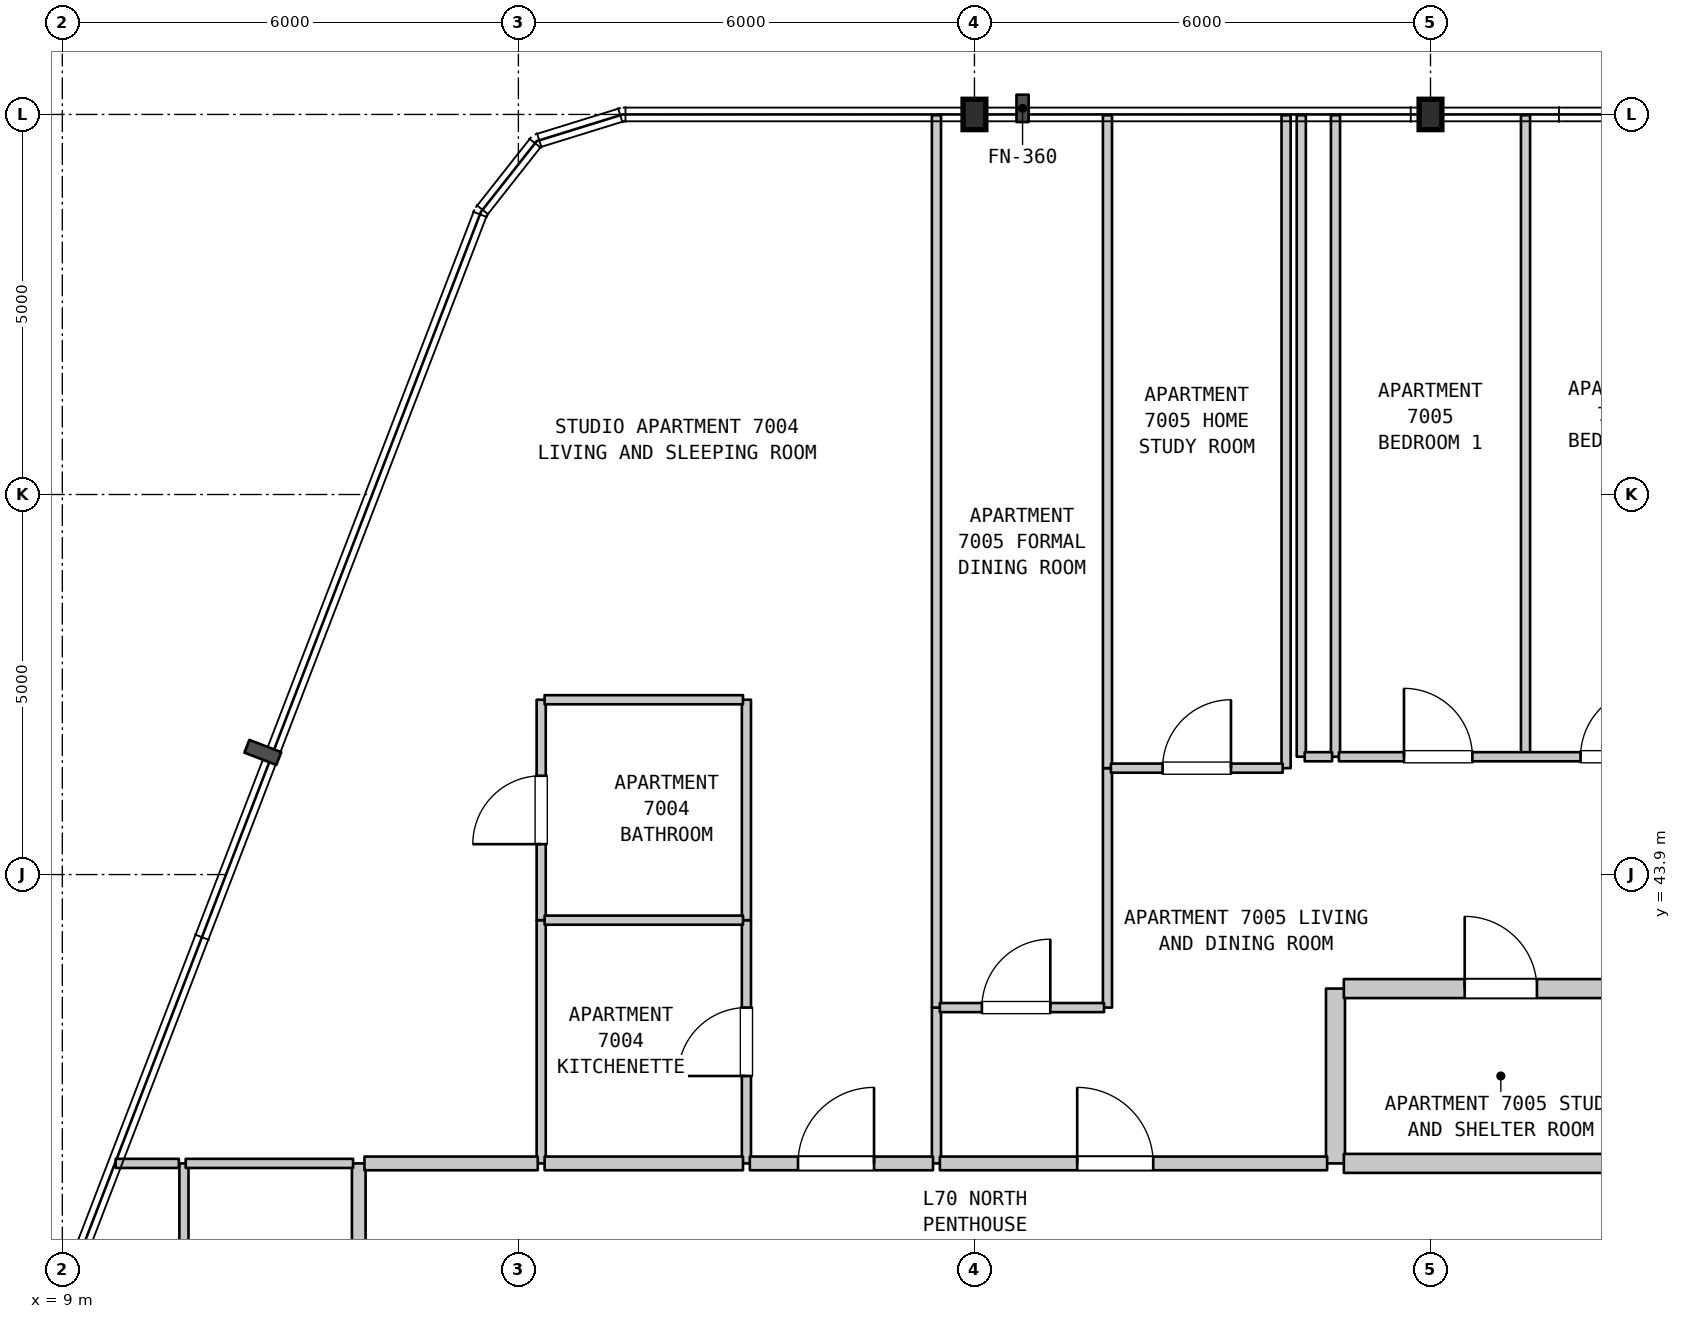
"""IFC4 building model, lengths in metres.
Left out: names, types, materials, properties, quantities, classifications, styles, units other than length and angle.
Written with IfcOpenShell. Run it as: python <this file> out.ifc"""

import sys

from ifc_helpers import new_model, si_unit, direction, frame, frame_2d, origin, origin_2d, place, context, subcontext, project, spatial, rectangle, i_section, extrude, element, fill, save


model = new_model("IFC4")
c1 = context("Model", 3, precision=1e-05, world=origin(), true_north=direction((0.0, 1.0)))
c2 = subcontext(c1, "Body", "Model", "MODEL_VIEW")
j1 = project(units=[si_unit("LENGTHUNIT", "METRE"), si_unit("PLANEANGLEUNIT", "RADIAN")], contexts=[c1])
p1 = place(None, origin())
s1 = spatial("IfcSite", under=j1, at=p1, CompositionType="ELEMENT")
p2 = place(p1, origin())
s2 = spatial("IfcBuilding", under=s1, at=p2, CompositionType="ELEMENT")
p3 = place(p2, frame((0.0, 0.0, 280.6)))
s3 = spatial("IfcBuildingStorey", under=s2, at=p3, CompositionType="ELEMENT", Elevation=280.6)
for number, where, z_axis, x_axis in (
    (1, (21.0, 53.9, 0.0), (0.0, 0.0, 1.0), (1.0, 0.0, 0.0)),
    (2, (27.0, 53.9, 0.0), (0.0, 0.0, 1.0), (1.0, 0.0, 0.0)),
):
    element("IfcColumn", number, at=place(p3, frame(where, z_axis=z_axis, x_axis=x_axis)), inside=s3, PredefinedType="COLUMN", context=c2, shape_type="SweptSolid", body=[
        extrude(i_section(OverallWidth=0.3, OverallDepth=0.4, WebThickness=0.013, FlangeThickness=0.024, FilletRadius=0.027, at=origin_2d()), origin(), (0.0, 0.0, 1.0), 3.7),
    ])
p4 = place(p3, frame((10.6, 31.5, 0.0), z_axis=(0.0, 0.0, 1.0), x_axis=(0.0, 1.0, 0.0)))
e3 = element("IfcWall", 3, at=p4, inside=s3, PredefinedType="PARTITIONING", context=c2, shape_type="SweptSolid", body=[
    extrude(rectangle(XDim=8.6, YDim=0.12, at=frame_2d((4.3, 0.0))), origin(), (0.0, 0.0, 1.0), 3.39),
])
p5 = place(p3, frame((12.9, 31.5, 0.0), z_axis=(0.0, 0.0, 1.0), x_axis=(0.0, 1.0, 0.0)))
e4 = element("IfcWall", 4, at=p5, inside=s3, PredefinedType="STANDARD", context=c2, shape_type="SweptSolid", body=[
    extrude(rectangle(XDim=8.6, YDim=0.18, at=frame_2d((4.3, 0.0))), origin(), (0.0, 0.0, 1.0), 3.39),
])
p6 = place(p3, frame((15.3, 40.1, 0.0), z_axis=(0.0, 0.0, 1.0), x_axis=(0.0, 1.0, 0.0)))
e5 = element("IfcWall", 5, at=p6, inside=s3, PredefinedType="PARTITIONING", context=c2, shape_type="SweptSolid", body=[
    extrude(rectangle(XDim=3.2, YDim=0.12, at=frame_2d((1.6, 0.0))), origin(), (0.0, 0.0, 1.0), 3.39),
])
p7 = place(p3, frame((15.3, 43.3, 0.0), z_axis=(0.0, 0.0, 1.0), x_axis=(0.0, 1.0, 0.0)))
e6 = element("IfcWall", 6, at=p7, inside=s3, PredefinedType="PARTITIONING", context=c2, shape_type="SweptSolid", body=[
    extrude(rectangle(XDim=2.9, YDim=0.12, at=frame_2d((1.45, 0.0))), origin(), (0.0, 0.0, 1.0), 3.39),
])
p8 = place(p7, frame((1.0, 0.0, 0.0)))
e7 = element("IfcOpeningElement", 7, at=p8, cuts=e6, PredefinedType="OPENING", context=c2, shape_type="SweptSolid", body=[
    extrude(rectangle(XDim=0.9, YDim=2.1, at=frame_2d((0.45, 1.05))), frame((0.0, 0.07, 0.0), z_axis=(0.0, -1.0, 0.0), x_axis=(1.0, 0.0, 0.0)), (0.0, 0.0, 1.0), 0.14),
])
p9 = place(p3, frame((18.0, 40.1, 0.0), z_axis=(0.0, 0.0, 1.0), x_axis=(0.0, 1.0, 0.0)))
e8 = element("IfcWall", 8, at=p9, inside=s3, PredefinedType="PARTITIONING", context=c2, shape_type="SweptSolid", body=[
    extrude(rectangle(XDim=3.2, YDim=0.12, at=frame_2d((1.6, 0.0))), origin(), (0.0, 0.0, 1.0), 3.39),
])
p10 = place(p9, frame((1.15, 0.0, 0.0)))
e9 = element("IfcOpeningElement", 9, at=p10, cuts=e8, PredefinedType="OPENING", context=c2, shape_type="SweptSolid", body=[
    extrude(rectangle(XDim=0.9, YDim=2.15, at=frame_2d((0.45, 1.075))), frame((0.0, 0.07, 0.0), z_axis=(0.0, -1.0, 0.0), x_axis=(1.0, 0.0, 0.0)), (0.0, 0.0, 1.0), 0.14),
])
p11 = place(p3, frame((18.0, 43.3, 0.0), z_axis=(0.0, 0.0, 1.0), x_axis=(0.0, 1.0, 0.0)))
e10 = element("IfcWall", 10, at=p11, inside=s3, PredefinedType="PARTITIONING", context=c2, shape_type="SweptSolid", body=[
    extrude(rectangle(XDim=2.9, YDim=0.12, at=frame_2d((1.45, 0.0))), origin(), (0.0, 0.0, 1.0), 3.39),
])
p12 = place(p3, frame((20.5, 40.1, 0.0), z_axis=(0.0, 0.0, 1.0), x_axis=(0.0, 1.0, 0.0)))
e11 = element("IfcWall", 11, at=p12, inside=s3, PredefinedType="PARTITIONING", context=c2, shape_type="SweptSolid", body=[
    extrude(rectangle(XDim=2.05, YDim=0.12, at=frame_2d((1.025, 0.0))), origin(), (0.0, 0.0, 1.0), 3.39),
])
p13 = place(p3, frame((20.5, 42.15, 0.0), z_axis=(0.0, 0.0, 1.0), x_axis=(0.0, 1.0, 0.0)))
e12 = element("IfcWall", 12, at=p13, inside=s3, PredefinedType="PARTITIONING", context=c2, shape_type="SweptSolid", body=[
    extrude(rectangle(XDim=11.74, YDim=0.12, at=frame_2d((5.87, 0.0))), origin(), (0.0, 0.0, 1.0), 3.39),
])
p14 = place(p3, frame((22.75, 42.15, 0.0), z_axis=(0.0, 0.0, 1.0), x_axis=(0.0, 1.0, 0.0)))
e13 = element("IfcWall", 13, at=p14, inside=s3, PredefinedType="PARTITIONING", context=c2, shape_type="SweptSolid", body=[
    extrude(rectangle(XDim=3.15, YDim=0.12, at=frame_2d((1.575, 0.0))), origin(), (0.0, 0.0, 1.0), 3.39),
])
for number, where, z_axis, x_axis in (
    (14, (22.75, 45.3, 0.0), (0.0, 0.0, 1.0), (0.0, 1.0, 0.0)),
    (15, (25.1, 45.3, 0.0), (0.0, 0.0, 1.0), (0.0, 1.0, 0.0)),
):
    element("IfcWall", number, at=place(p3, frame(where, z_axis=z_axis, x_axis=x_axis)), inside=s3, PredefinedType="PARTITIONING", context=c2, shape_type="SweptSolid", body=[
        extrude(rectangle(XDim=8.59, YDim=0.12, at=frame_2d((4.295, 0.0))), origin(), (0.0, 0.0, 1.0), 3.39),
    ])
p15 = place(p3, frame((25.3, 45.45, 0.0), z_axis=(0.0, 0.0, 1.0), x_axis=(0.0, 1.0, 0.0)))
e16 = element("IfcWall", 16, at=p15, inside=s3, PredefinedType="PARTITIONING", context=c2, shape_type="SweptSolid", body=[
    extrude(rectangle(XDim=8.44, YDim=0.12, at=frame_2d((4.22, 0.0))), origin(), (0.0, 0.0, 1.0), 3.39),
])
p16 = place(p3, frame((25.75, 40.1, 0.0), z_axis=(0.0, 0.0, 1.0), x_axis=(0.0, 1.0, 0.0)))
e17 = element("IfcWall", 17, at=p16, inside=s3, PredefinedType="STANDARD", context=c2, shape_type="SweptSolid", body=[
    extrude(rectangle(XDim=2.3, YDim=0.25, at=frame_2d((1.15, 0.0))), origin(), (0.0, 0.0, 1.0), 3.39),
])
for number, where, z_axis, x_axis in (
    (18, (25.75, 45.45, 0.0), (0.0, 0.0, 1.0), (0.0, 1.0, 0.0)),
    (19, (28.25, 45.45, 0.0), (0.0, 0.0, 1.0), (0.0, 1.0, 0.0)),
):
    element("IfcWall", number, at=place(p3, frame(where, z_axis=z_axis, x_axis=x_axis)), inside=s3, PredefinedType="PARTITIONING", context=c2, shape_type="SweptSolid", body=[
        extrude(rectangle(XDim=8.44, YDim=0.12, at=frame_2d((4.22, 0.0))), origin(), (0.0, 0.0, 1.0), 3.39),
    ])
p17 = place(p3, frame((9.702, 40.1, 0.0), z_axis=(0.0, 0.0, 1.0), x_axis=(1.0, 0.0, 0.0)))
e20 = element("IfcWall", 20, at=p17, inside=s3, PredefinedType="PARTITIONING", context=c2, shape_type="SweptSolid", body=[
    extrude(rectangle(XDim=0.831, YDim=0.12, at=frame_2d((0.416, 0.0))), origin(), (0.0, 0.0, 1.0), 3.39),
])
p18 = place(p3, frame((10.623, 40.1, 0.0), z_axis=(0.0, 0.0, 1.0), x_axis=(1.0, 0.0, 0.0)))
e21 = element("IfcWall", 21, at=p18, inside=s3, PredefinedType="PARTITIONING", context=c2, shape_type="SweptSolid", body=[
    extrude(rectangle(XDim=2.202, YDim=0.12, at=frame_2d((1.101, 0.0))), origin(), (0.0, 0.0, 1.0), 3.39),
])
p19 = place(p3, frame((12.975, 40.1, 0.0), z_axis=(0.0, 0.0, 1.0), x_axis=(1.0, 0.0, 0.0)))
e22 = element("IfcWall", 22, at=p19, inside=s3, PredefinedType="STANDARD", context=c2, shape_type="SweptSolid", body=[
    extrude(rectangle(XDim=2.28, YDim=0.18, at=frame_2d((1.14, 0.0))), origin(), (0.0, 0.0, 1.0), 3.39),
])
p20 = place(p3, frame((15.345, 40.1, 0.0), z_axis=(0.0, 0.0, 1.0), x_axis=(1.0, 0.0, 0.0)))
e23 = element("IfcWall", 23, at=p20, inside=s3, PredefinedType="STANDARD", context=c2, shape_type="SweptSolid", body=[
    extrude(rectangle(XDim=2.61, YDim=0.18, at=frame_2d((1.305, 0.0))), origin(), (0.0, 0.0, 1.0), 3.39),
])
p21 = place(p3, frame((18.045, 40.1, 0.0), z_axis=(0.0, 0.0, 1.0), x_axis=(1.0, 0.0, 0.0)))
e24 = element("IfcWall", 24, at=p21, inside=s3, PredefinedType="STANDARD", context=c2, shape_type="SweptSolid", body=[
    extrude(rectangle(XDim=2.41, YDim=0.18, at=frame_2d((1.205, 0.0))), origin(), (0.0, 0.0, 1.0), 3.39),
])
p22 = place(p21, frame((0.634, 0.0, 0.0)))
e25 = element("IfcOpeningElement", 25, at=p22, cuts=e24, PredefinedType="OPENING", context=c2, shape_type="SweptSolid", body=[
    extrude(rectangle(XDim=1.0, YDim=2.15, at=frame_2d((0.5, 1.075))), frame((0.0, 0.1, 0.0), z_axis=(0.0, -1.0, 0.0), x_axis=(1.0, 0.0, 0.0)), (0.0, 0.0, 1.0), 0.2),
])
p23 = place(p3, frame((20.545, 40.1, 0.0), z_axis=(0.0, 0.0, 1.0), x_axis=(1.0, 0.0, 0.0)))
e26 = element("IfcWall", 26, at=p23, inside=s3, PredefinedType="STANDARD", context=c2, shape_type="SweptSolid", body=[
    extrude(rectangle(XDim=5.095, YDim=0.18, at=frame_2d((2.547, 0.0))), origin(), (0.0, 0.0, 1.0), 3.39),
])
p24 = place(p23, frame((1.807, 0.0, 0.0)))
e27 = element("IfcOpeningElement", 27, at=p24, cuts=e26, PredefinedType="OPENING", context=c2, shape_type="SweptSolid", body=[
    extrude(rectangle(XDim=1.0, YDim=2.15, at=frame_2d((0.5, 1.075))), frame((0.0, 0.1, 0.0), z_axis=(0.0, -1.0, 0.0), x_axis=(1.0, 0.0, 0.0)), (0.0, 0.0, 1.0), 0.2),
])
p25 = place(p3, frame((25.86, 40.1, 0.0), z_axis=(0.0, 0.0, 1.0), x_axis=(1.0, 0.0, 0.0)))
e28 = element("IfcWall", 28, at=p25, inside=s3, PredefinedType="STANDARD", context=c2, shape_type="SweptSolid", body=[
    extrude(rectangle(XDim=4.13, YDim=0.25, at=frame_2d((2.065, 0.0))), origin(), (0.0, 0.0, 1.0), 3.39),
])
p26 = place(p3, frame((20.545, 42.15, 0.0), z_axis=(0.0, 0.0, 1.0), x_axis=(1.0, 0.0, 0.0)))
e29 = element("IfcWall", 29, at=p26, inside=s3, PredefinedType="PARTITIONING", context=c2, shape_type="SweptSolid", body=[
    extrude(rectangle(XDim=2.16, YDim=0.12, at=frame_2d((1.08, 0.0))), origin(), (0.0, 0.0, 1.0), 3.39),
])
p27 = place(p26, frame((0.553, 0.0, 0.0)))
e30 = element("IfcOpeningElement", 30, at=p27, cuts=e29, PredefinedType="OPENING", context=c2, shape_type="SweptSolid", body=[
    extrude(rectangle(XDim=0.9, YDim=2.15, at=frame_2d((0.45, 1.075))), frame((0.0, 0.07, 0.0), z_axis=(0.0, -1.0, 0.0), x_axis=(1.0, 0.0, 0.0)), (0.0, 0.0, 1.0), 0.14),
])
p28 = place(p3, frame((25.86, 42.4, 0.0), z_axis=(0.0, 0.0, 1.0), x_axis=(1.0, 0.0, 0.0)))
e31 = element("IfcWall", 31, at=p28, inside=s3, PredefinedType="STANDARD", context=c2, shape_type="SweptSolid", body=[
    extrude(rectangle(XDim=4.13, YDim=0.25, at=frame_2d((2.065, 0.0))), origin(), (0.0, 0.0, 1.0), 3.39),
])
p29 = place(p28, frame((1.59, 0.0, 0.0)))
e32 = element("IfcOpeningElement", 32, at=p29, cuts=e31, PredefinedType="OPENING", context=c2, shape_type="SweptSolid", body=[
    extrude(rectangle(XDim=0.95, YDim=2.15, at=frame_2d((0.475, 1.075))), frame((0.0, 0.135, 0.0), z_axis=(0.0, -1.0, 0.0), x_axis=(1.0, 0.0, 0.0)), (0.0, 0.0, 1.0), 0.27),
])
p30 = place(p3, frame((15.345, 43.3, 0.0), z_axis=(0.0, 0.0, 1.0), x_axis=(1.0, 0.0, 0.0)))
e33 = element("IfcWall", 33, at=p30, inside=s3, PredefinedType="PARTITIONING", context=c2, shape_type="SweptSolid", body=[
    extrude(rectangle(XDim=2.61, YDim=0.12, at=frame_2d((1.305, 0.0))), origin(), (0.0, 0.0, 1.0), 3.39),
])
p31 = place(p3, frame((22.795, 45.3, 0.0), z_axis=(0.0, 0.0, 1.0), x_axis=(1.0, 0.0, 0.0)))
e34 = element("IfcWall", 34, at=p31, inside=s3, PredefinedType="PARTITIONING", context=c2, shape_type="SweptSolid", body=[
    extrude(rectangle(XDim=2.26, YDim=0.12, at=frame_2d((1.13, 0.0))), origin(), (0.0, 0.0, 1.0), 3.39),
])
p32 = place(p31, frame((0.68, 0.0, 0.0)))
e35 = element("IfcOpeningElement", 35, at=p32, cuts=e34, PredefinedType="OPENING", context=c2, shape_type="SweptSolid", body=[
    extrude(rectangle(XDim=0.9, YDim=2.15, at=frame_2d((0.45, 1.075))), frame((0.0, 0.07, 0.0), z_axis=(0.0, -1.0, 0.0), x_axis=(1.0, 0.0, 0.0)), (0.0, 0.0, 1.0), 0.14),
])
p33 = place(p3, frame((25.345, 45.45, 0.0), z_axis=(0.0, 0.0, 1.0), x_axis=(1.0, 0.0, 0.0)))
e36 = element("IfcWall", 36, at=p33, inside=s3, PredefinedType="PARTITIONING", context=c2, shape_type="SweptSolid", body=[
    extrude(rectangle(XDim=0.36, YDim=0.12, at=frame_2d((0.18, 0.0))), origin(), (0.0, 0.0, 1.0), 3.39),
])
p34 = place(p3, frame((25.795, 45.45, 0.0), z_axis=(0.0, 0.0, 1.0), x_axis=(1.0, 0.0, 0.0)))
e37 = element("IfcWall", 37, at=p34, inside=s3, PredefinedType="PARTITIONING", context=c2, shape_type="SweptSolid", body=[
    extrude(rectangle(XDim=15.145, YDim=0.12, at=frame_2d((7.573, 0.0))), origin(), (0.0, 0.0, 1.0), 3.39),
])
p35 = place(p34, frame((0.856, 0.0, 0.0)))
e38 = element("IfcOpeningElement", 38, at=p35, cuts=e37, PredefinedType="OPENING", context=c2, shape_type="SweptSolid", body=[
    extrude(rectangle(XDim=0.9, YDim=2.15, at=frame_2d((0.45, 1.075))), frame((0.0, 0.07, 0.0), z_axis=(0.0, -1.0, 0.0), x_axis=(1.0, 0.0, 0.0)), (0.0, 0.0, 1.0), 0.14),
])
p36 = place(p34, frame((3.179, 0.0, 0.0)))
e39 = element("IfcOpeningElement", 39, at=p36, cuts=e37, PredefinedType="OPENING", context=c2, shape_type="SweptSolid", body=[
    extrude(rectangle(XDim=0.9, YDim=2.15, at=frame_2d((0.45, 1.075))), frame((0.0, 0.07, 0.0), z_axis=(0.0, -1.0, 0.0), x_axis=(1.0, 0.0, 0.0)), (0.0, 0.0, 1.0), 0.14),
])
p37 = place(p34, frame((5.756, 0.0, 0.0)))
e40 = element("IfcOpeningElement", 40, at=p37, cuts=e37, PredefinedType="OPENING", context=c2, shape_type="SweptSolid", body=[
    extrude(rectangle(XDim=0.9, YDim=2.15, at=frame_2d((0.45, 1.075))), frame((0.0, 0.07, 0.0), z_axis=(0.0, -1.0, 0.0), x_axis=(1.0, 0.0, 0.0)), (0.0, 0.0, 1.0), 0.14),
])
p38 = place(p34, frame((8.18, 0.0, 0.0)))
e41 = element("IfcOpeningElement", 41, at=p38, cuts=e37, PredefinedType="OPENING", context=c2, shape_type="SweptSolid", body=[
    extrude(rectangle(XDim=0.9, YDim=2.15, at=frame_2d((0.45, 1.075))), frame((0.0, 0.07, 0.0), z_axis=(0.0, -1.0, 0.0), x_axis=(1.0, 0.0, 0.0)), (0.0, 0.0, 1.0), 0.14),
])
p39 = place(p34, frame((10.68, 0.0, 0.0)))
e42 = element("IfcOpeningElement", 42, at=p39, cuts=e37, PredefinedType="OPENING", context=c2, shape_type="SweptSolid", body=[
    extrude(rectangle(XDim=0.9, YDim=2.15, at=frame_2d((0.45, 1.075))), frame((0.0, 0.07, 0.0), z_axis=(0.0, -1.0, 0.0), x_axis=(1.0, 0.0, 0.0)), (0.0, 0.0, 1.0), 0.14),
])
p40 = place(p34, frame((12.877, 0.0, 0.0)))
e43 = element("IfcOpeningElement", 43, at=p40, cuts=e37, PredefinedType="OPENING", context=c2, shape_type="SweptSolid", body=[
    extrude(rectangle(XDim=0.9, YDim=2.15, at=frame_2d((0.45, 1.075))), frame((0.0, 0.07, 0.0), z_axis=(0.0, -1.0, 0.0), x_axis=(1.0, 0.0, 0.0)), (0.0, 0.0, 1.0), 0.14),
])
p41 = place(p3, frame((15.345, 46.2, 0.0), z_axis=(0.0, 0.0, 1.0), x_axis=(1.0, 0.0, 0.0)))
e44 = element("IfcWall", 44, at=p41, inside=s3, PredefinedType="PARTITIONING", context=c2, shape_type="SweptSolid", body=[
    extrude(rectangle(XDim=2.61, YDim=0.12, at=frame_2d((1.305, 0.0))), origin(), (0.0, 0.0, 1.0), 3.39),
])
p42 = place(p8, origin())
e45 = element("IfcDoor", 45, at=p42, inside=s3, OperationType="SINGLE_SWING_LEFT", PredefinedType="DOOR", context=c2, shape_type="SweptSolid", body=[
    extrude(rectangle(XDim=0.9, YDim=2.1, at=frame_2d((0.45, 1.05))), frame((0.0, 0.025, 0.0), z_axis=(0.0, -1.0, 0.0), x_axis=(1.0, 0.0, 0.0)), (0.0, 0.0, 1.0), 0.05),
])
fill(e7, e45)
p43 = place(p10, origin())
e46 = element("IfcDoor", 46, at=p43, inside=s3, OperationType="SINGLE_SWING_LEFT", PredefinedType="DOOR", context=c2, shape_type="SweptSolid", body=[
    extrude(rectangle(XDim=0.9, YDim=2.15, at=frame_2d((0.45, 1.075))), frame((0.0, 0.025, 0.0), z_axis=(0.0, -1.0, 0.0), x_axis=(1.0, 0.0, 0.0)), (0.0, 0.0, 1.0), 0.05),
])
fill(e9, e46)
p44 = place(p22, origin())
e47 = element("IfcDoor", 47, at=p44, inside=s3, OperationType="SINGLE_SWING_RIGHT", PredefinedType="DOOR", context=c2, shape_type="SweptSolid", body=[
    extrude(rectangle(XDim=1.0, YDim=2.15, at=frame_2d((0.5, 1.075))), frame((0.0, 0.025, 0.0), z_axis=(0.0, -1.0, 0.0), x_axis=(1.0, 0.0, 0.0)), (0.0, 0.0, 1.0), 0.05),
])
fill(e25, e47)
p45 = place(p24, origin())
e48 = element("IfcDoor", 48, at=p45, inside=s3, OperationType="SINGLE_SWING_LEFT", PredefinedType="DOOR", context=c2, shape_type="SweptSolid", body=[
    extrude(rectangle(XDim=1.0, YDim=2.15, at=frame_2d((0.5, 1.075))), frame((0.0, 0.025, 0.0), z_axis=(0.0, -1.0, 0.0), x_axis=(1.0, 0.0, 0.0)), (0.0, 0.0, 1.0), 0.05),
])
fill(e27, e48)
p46 = place(p27, origin())
e49 = element("IfcDoor", 49, at=p46, inside=s3, OperationType="SINGLE_SWING_RIGHT", PredefinedType="DOOR", context=c2, shape_type="SweptSolid", body=[
    extrude(rectangle(XDim=0.9, YDim=2.15, at=frame_2d((0.45, 1.075))), frame((0.0, 0.025, 0.0), z_axis=(0.0, -1.0, 0.0), x_axis=(1.0, 0.0, 0.0)), (0.0, 0.0, 1.0), 0.05),
])
fill(e30, e49)
p47 = place(p29, origin())
e50 = element("IfcDoor", 50, at=p47, inside=s3, OperationType="SINGLE_SWING_LEFT", PredefinedType="DOOR", context=c2, shape_type="SweptSolid", body=[
    extrude(rectangle(XDim=0.95, YDim=2.15, at=frame_2d((0.475, 1.075))), frame((0.0, 0.025, 0.0), z_axis=(0.0, -1.0, 0.0), x_axis=(1.0, 0.0, 0.0)), (0.0, 0.0, 1.0), 0.05),
])
fill(e32, e50)
p48 = place(p32, origin())
e51 = element("IfcDoor", 51, at=p48, inside=s3, OperationType="SINGLE_SWING_RIGHT", PredefinedType="DOOR", context=c2, shape_type="SweptSolid", body=[
    extrude(rectangle(XDim=0.9, YDim=2.15, at=frame_2d((0.45, 1.075))), frame((0.0, 0.025, 0.0), z_axis=(0.0, -1.0, 0.0), x_axis=(1.0, 0.0, 0.0)), (0.0, 0.0, 1.0), 0.05),
])
fill(e35, e51)
p49 = place(p35, origin())
e52 = element("IfcDoor", 52, at=p49, inside=s3, OperationType="SINGLE_SWING_LEFT", PredefinedType="DOOR", context=c2, shape_type="SweptSolid", body=[
    extrude(rectangle(XDim=0.9, YDim=2.15, at=frame_2d((0.45, 1.075))), frame((0.0, 0.025, 0.0), z_axis=(0.0, -1.0, 0.0), x_axis=(1.0, 0.0, 0.0)), (0.0, 0.0, 1.0), 0.05),
])
fill(e38, e52)
p50 = place(p36, origin())
e53 = element("IfcDoor", 53, at=p50, inside=s3, OperationType="SINGLE_SWING_RIGHT", PredefinedType="DOOR", context=c2, shape_type="SweptSolid", body=[
    extrude(rectangle(XDim=0.9, YDim=2.15, at=frame_2d((0.45, 1.075))), frame((0.0, 0.025, 0.0), z_axis=(0.0, -1.0, 0.0), x_axis=(1.0, 0.0, 0.0)), (0.0, 0.0, 1.0), 0.05),
])
fill(e39, e53)
save(model, sys.argv[1])
